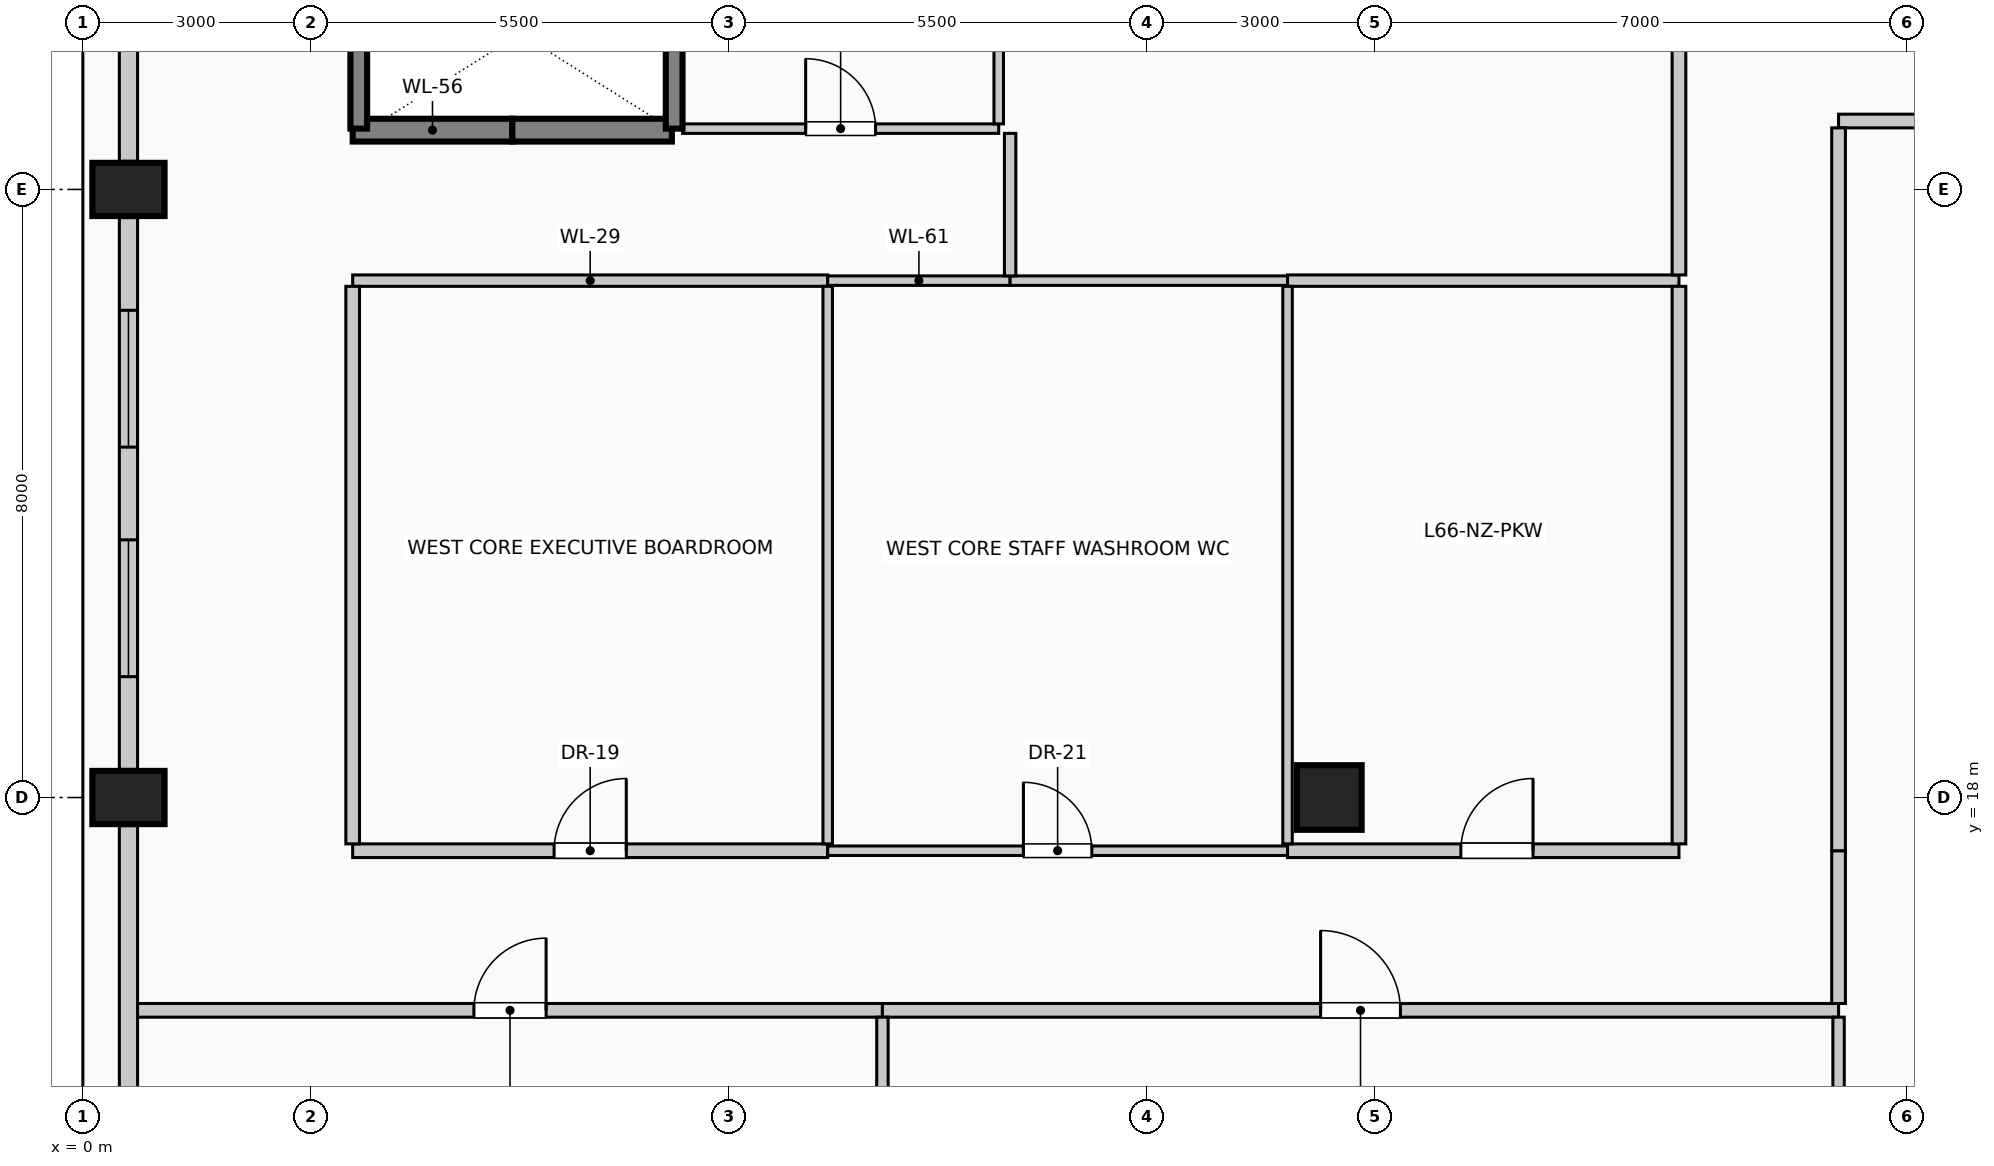
"""IFC4 building model, lengths in metres.
Left out: names, types, materials, properties, quantities, classifications, styles, units other than length and angle.
Written with IfcOpenShell. Run it as: python <this file> out.ifc"""

import sys

from ifc_helpers import new_model, si_unit, direction, frame, frame_2d, origin, origin_2d, place, context, subcontext, project, spatial, rectangle, circle, extrude, element, fill, save


model = new_model("IFC4")
c1 = context("Model", 3, precision=1e-05, world=origin(), true_north=direction((0.0, 1.0)))
c2 = subcontext(c1, "Body", "Model", "MODEL_VIEW")
j1 = project(units=[si_unit("LENGTHUNIT", "METRE"), si_unit("PLANEANGLEUNIT", "RADIAN")], contexts=[c1])
p1 = place(None, origin())
s1 = spatial("IfcSite", under=j1, at=p1, CompositionType="ELEMENT")
p2 = place(p1, origin())
s2 = spatial("IfcBuilding", under=s1, at=p2, CompositionType="ELEMENT")
p3 = place(p2, frame((0.0, 0.0, 272.6)))
s3 = spatial("IfcBuildingStorey", under=s2, at=p3, CompositionType="ELEMENT", Elevation=272.6)
for number, where, z_axis, x_axis in (
    (1, (0.6, 18.0, 0.0), (0.0, 0.0, 1.0), (0.0, 1.0, 0.0)),
    (2, (0.6, 26.0, 0.0), (0.0, 0.0, 1.0), (0.0, 1.0, 0.0)),
):
    element("IfcColumn", number, at=place(p3, frame(where, z_axis=z_axis, x_axis=x_axis)), inside=s3, PredefinedType="COLUMN", context=c2, shape_type="SweptSolid", body=[
        extrude(rectangle(XDim=0.7, YDim=0.95, at=origin_2d()), origin(), (0.0, 0.0, 1.0), 4.0),
    ])
p4 = place(p3, frame((16.4, 18.0, 0.0), z_axis=(0.0, 0.0, 1.0), x_axis=(1.0, 0.0, 0.0)))
e3 = element("IfcColumn", 3, at=p4, inside=s3, PredefinedType="COLUMN", context=c2, shape_type="SweptSolid", body=[
    extrude(circle(Radius=0.425, at=origin_2d()), origin(), (0.0, 0.0, 1.0), 4.0),
])
p5 = place(p3, frame((0.6, 10.37, 0.0), z_axis=(0.0, 0.0, 1.0), x_axis=(0.0, 1.0, 0.0)))
e4 = element("IfcWall", 4, at=p5, inside=s3, PredefinedType="SOLIDWALL", context=c2, shape_type="SweptSolid", body=[
    extrude(rectangle(XDim=7.26, YDim=0.24, at=frame_2d((3.63, 0.0))), origin(), (0.0, 0.0, 1.0), 3.0),
])
p6 = place(p5, frame((1.22, 0.0, 0.42)))
e5 = element("IfcOpeningElement", 5, at=p6, cuts=e4, PredefinedType="OPENING", context=c2, shape_type="SweptSolid", body=[
    extrude(rectangle(XDim=1.8, YDim=2.2, at=frame_2d((0.9, 1.1))), frame((0.0, 0.13, 0.0), z_axis=(0.0, -1.0, 0.0), x_axis=(1.0, 0.0, 0.0)), (0.0, 0.0, 1.0), 0.26),
])
p7 = place(p3, frame((0.6, 18.37, 0.0), z_axis=(0.0, 0.0, 1.0), x_axis=(0.0, 1.0, 0.0)))
e6 = element("IfcWall", 6, at=p7, inside=s3, PredefinedType="SOLIDWALL", context=c2, shape_type="SweptSolid", body=[
    extrude(rectangle(XDim=7.26, YDim=0.24, at=frame_2d((3.63, 0.0))), origin(), (0.0, 0.0, 1.0), 3.0),
])
p8 = place(p7, frame((1.22, 0.0, 0.42)))
e7 = element("IfcOpeningElement", 7, at=p8, cuts=e6, PredefinedType="OPENING", context=c2, shape_type="SweptSolid", body=[
    extrude(rectangle(XDim=1.8, YDim=2.2, at=frame_2d((0.9, 1.1))), frame((0.0, 0.13, 0.0), z_axis=(0.0, -1.0, 0.0), x_axis=(1.0, 0.0, 0.0)), (0.0, 0.0, 1.0), 0.26),
])
p9 = place(p7, frame((4.24, 0.0, 0.42)))
e8 = element("IfcOpeningElement", 8, at=p9, cuts=e6, PredefinedType="OPENING", context=c2, shape_type="SweptSolid", body=[
    extrude(rectangle(XDim=1.8, YDim=2.2, at=frame_2d((0.9, 1.1))), frame((0.0, 0.13, 0.0), z_axis=(0.0, -1.0, 0.0), x_axis=(1.0, 0.0, 0.0)), (0.0, 0.0, 1.0), 0.26),
])
p10 = place(p3, frame((0.6, 26.37, 0.0), z_axis=(0.0, 0.0, 1.0), x_axis=(0.0, 1.0, 0.0)))
e9 = element("IfcWall", 9, at=p10, inside=s3, PredefinedType="SOLIDWALL", context=c2, shape_type="SweptSolid", body=[
    extrude(rectangle(XDim=7.26, YDim=0.24, at=frame_2d((3.63, 0.0))), origin(), (0.0, 0.0, 1.0), 3.0),
])
p11 = place(p3, frame((5.65, 26.78, 0.0), z_axis=(0.0, 0.0, 1.0), x_axis=(-1.0, 0.0, 0.0)))
e10 = element("IfcWall", 10, at=p11, inside=s3, PredefinedType="SOLIDWALL", context=c2, shape_type="SweptSolid", body=[
    extrude(rectangle(XDim=2.1, YDim=0.3, at=frame_2d((1.05, 0.0))), origin(), (0.0, 0.0, 1.0), 4.0),
])
p12 = place(p3, frame((7.75, 26.78, 0.0), z_axis=(0.0, 0.0, 1.0), x_axis=(-1.0, 0.0, 0.0)))
e11 = element("IfcWall", 11, at=p12, inside=s3, PredefinedType="SOLIDWALL", context=c2, shape_type="SweptSolid", body=[
    extrude(rectangle(XDim=2.1, YDim=0.3, at=frame_2d((1.05, 0.0))), origin(), (0.0, 0.0, 1.0), 4.0),
])
p13 = place(p3, frame((3.63, 26.8, 0.0), z_axis=(0.0, 0.0, 1.0), x_axis=(0.0, 1.0, 0.0)))
e12 = element("IfcWall", 12, at=p13, inside=s3, PredefinedType="SOLIDWALL", context=c2, shape_type="SweptSolid", body=[
    extrude(rectangle(XDim=5.55, YDim=0.22, at=frame_2d((2.775, 0.0))), origin(), (0.0, 0.0, 1.0), 4.0),
])
p14 = place(p3, frame((7.78, 26.8, 0.0), z_axis=(0.0, 0.0, 1.0), x_axis=(0.0, 1.0, 0.0)))
e13 = element("IfcWall", 13, at=p14, inside=s3, PredefinedType="SOLIDWALL", context=c2, shape_type="SweptSolid", body=[
    extrude(rectangle(XDim=2.8, YDim=0.22, at=frame_2d((1.4, 0.0))), origin(), (0.0, 0.0, 1.0), 4.0),
])
p15 = place(p3, frame((0.72, 15.2, 0.0), z_axis=(0.0, 0.0, 1.0), x_axis=(1.0, 0.0, 0.0)))
e14 = element("IfcWall", 14, at=p15, inside=s3, PredefinedType="PARTITIONING", context=c2, shape_type="SweptSolid", body=[
    extrude(rectangle(XDim=9.8, YDim=0.18, at=frame_2d((4.9, 0.0))), origin(), (0.0, 0.0, 1.0), 3.75),
])
p16 = place(p15, frame((4.425, 0.0, 0.0)))
e15 = element("IfcOpeningElement", 15, at=p16, cuts=e14, PredefinedType="OPENING", context=c2, shape_type="SweptSolid", body=[
    extrude(rectangle(XDim=0.95, YDim=2.15, at=frame_2d((0.475, 1.075))), frame((0.0, 0.1, 0.0), z_axis=(0.0, -1.0, 0.0), x_axis=(1.0, 0.0, 0.0)), (0.0, 0.0, 1.0), 0.2),
])
p17 = place(p3, frame((10.52, 15.2, 0.0), z_axis=(0.0, 0.0, 1.0), x_axis=(1.0, 0.0, 0.0)))
e16 = element("IfcWall", 16, at=p17, inside=s3, PredefinedType="PARTITIONING", context=c2, shape_type="SweptSolid", body=[
    extrude(rectangle(XDim=12.58, YDim=0.18, at=frame_2d((6.29, 0.0))), origin(), (0.0, 0.0, 1.0), 3.75),
])
p18 = place(p17, frame((5.765, 0.0, 0.0)))
e17 = element("IfcOpeningElement", 17, at=p18, cuts=e16, PredefinedType="OPENING", context=c2, shape_type="SweptSolid", body=[
    extrude(rectangle(XDim=1.05, YDim=2.15, at=frame_2d((0.525, 1.075))), frame((0.0, 0.1, 0.0), z_axis=(0.0, -1.0, 0.0), x_axis=(1.0, 0.0, 0.0)), (0.0, 0.0, 1.0), 0.2),
])
p19 = place(p3, frame((3.55, 17.3, 0.0), z_axis=(0.0, 0.0, 1.0), x_axis=(1.0, 0.0, 0.0)))
e18 = element("IfcWall", 18, at=p19, inside=s3, PredefinedType="PARTITIONING", context=c2, shape_type="SweptSolid", body=[
    extrude(rectangle(XDim=6.25, YDim=0.18, at=frame_2d((3.125, 0.0))), origin(), (0.0, 0.0, 1.0), 3.75),
])
p20 = place(p19, frame((2.65, 0.0, 0.0)))
e19 = element("IfcOpeningElement", 19, at=p20, cuts=e18, PredefinedType="OPENING", context=c2, shape_type="SweptSolid", body=[
    extrude(rectangle(XDim=0.95, YDim=2.15, at=frame_2d((0.475, 1.075))), frame((0.0, 0.1, 0.0), z_axis=(0.0, -1.0, 0.0), x_axis=(1.0, 0.0, 0.0)), (0.0, 0.0, 1.0), 0.2),
])
p21 = place(p3, frame((9.8, 17.3, 0.0), z_axis=(0.0, 0.0, 1.0), x_axis=(1.0, 0.0, 0.0)))
e20 = element("IfcWall", 20, at=p21, inside=s3, PredefinedType="PARTITIONING", context=c2, shape_type="SweptSolid", body=[
    extrude(rectangle(XDim=6.05, YDim=0.125, at=frame_2d((3.025, 0.0))), origin(), (0.0, 0.0, 1.0), 3.75),
])
p22 = place(p21, frame((2.575, 0.0, 0.0)))
e21 = element("IfcOpeningElement", 21, at=p22, cuts=e20, PredefinedType="OPENING", context=c2, shape_type="SweptSolid", body=[
    extrude(rectangle(XDim=0.9, YDim=2.1, at=frame_2d((0.45, 1.05))), frame((0.0, 0.073, 0.0), z_axis=(0.0, -1.0, 0.0), x_axis=(1.0, 0.0, 0.0)), (0.0, 0.0, 1.0), 0.145),
])
p23 = place(p3, frame((15.85, 17.3, 0.0), z_axis=(0.0, 0.0, 1.0), x_axis=(1.0, 0.0, 0.0)))
e22 = element("IfcWall", 22, at=p23, inside=s3, PredefinedType="PARTITIONING", context=c2, shape_type="SweptSolid", body=[
    extrude(rectangle(XDim=5.15, YDim=0.18, at=frame_2d((2.575, 0.0))), origin(), (0.0, 0.0, 1.0), 3.75),
])
p24 = place(p23, frame((2.28, 0.0, 0.0)))
e23 = element("IfcOpeningElement", 23, at=p24, cuts=e22, PredefinedType="OPENING", context=c2, shape_type="SweptSolid", body=[
    extrude(rectangle(XDim=0.95, YDim=2.15, at=frame_2d((0.475, 1.075))), frame((0.0, 0.1, 0.0), z_axis=(0.0, -1.0, 0.0), x_axis=(1.0, 0.0, 0.0)), (0.0, 0.0, 1.0), 0.2),
])
p25 = place(p3, frame((3.55, 24.8, 0.0), z_axis=(0.0, 0.0, 1.0), x_axis=(1.0, 0.0, 0.0)))
e24 = element("IfcWall", 24, at=p25, inside=s3, PredefinedType="PARTITIONING", context=c2, shape_type="SweptSolid", body=[
    extrude(rectangle(XDim=6.25, YDim=0.15, at=frame_2d((3.125, 0.0))), origin(), (0.0, 0.0, 1.0), 3.75),
])
p26 = place(p3, frame((9.8, 24.8, 0.0), z_axis=(0.0, 0.0, 1.0), x_axis=(1.0, 0.0, 0.0)))
e25 = element("IfcWall", 25, at=p26, inside=s3, PredefinedType="PARTITIONING", context=c2, shape_type="SweptSolid", body=[
    extrude(rectangle(XDim=2.4, YDim=0.125, at=frame_2d((1.2, 0.0))), origin(), (0.0, 0.0, 1.0), 3.75),
])
p27 = place(p3, frame((12.2, 24.8, 0.0), z_axis=(0.0, 0.0, 1.0), x_axis=(1.0, 0.0, 0.0)))
e26 = element("IfcWall", 26, at=p27, inside=s3, PredefinedType="PARTITIONING", context=c2, shape_type="SweptSolid", body=[
    extrude(rectangle(XDim=3.65, YDim=0.125, at=frame_2d((1.825, 0.0))), origin(), (0.0, 0.0, 1.0), 3.75),
])
p28 = place(p3, frame((15.85, 24.8, 0.0), z_axis=(0.0, 0.0, 1.0), x_axis=(1.0, 0.0, 0.0)))
e27 = element("IfcWall", 27, at=p28, inside=s3, PredefinedType="PARTITIONING", context=c2, shape_type="SweptSolid", body=[
    extrude(rectangle(XDim=5.15, YDim=0.15, at=frame_2d((2.575, 0.0))), origin(), (0.0, 0.0, 1.0), 3.75),
])
p29 = place(p3, frame((7.89, 26.8, 0.0), z_axis=(0.0, 0.0, 1.0), x_axis=(1.0, 0.0, 0.0)))
e28 = element("IfcWall", 28, at=p29, inside=s3, PredefinedType="PARTITIONING", context=c2, shape_type="SweptSolid", body=[
    extrude(rectangle(XDim=4.16, YDim=0.125, at=frame_2d((2.08, 0.0))), origin(), (0.0, 0.0, 1.0), 3.75),
])
p30 = place(p29, frame((1.62, 0.0, 0.0)))
e29 = element("IfcOpeningElement", 29, at=p30, cuts=e28, PredefinedType="OPENING", context=c2, shape_type="SweptSolid", body=[
    extrude(rectangle(XDim=0.92, YDim=2.1, at=frame_2d((0.46, 1.05))), frame((0.0, 0.073, 0.0), z_axis=(0.0, -1.0, 0.0), x_axis=(1.0, 0.0, 0.0)), (0.0, 0.0, 1.0), 0.145),
])
p31 = place(p3, frame((23.1, 26.9, 0.0), z_axis=(0.0, 0.0, 1.0), x_axis=(1.0, 0.0, 0.0)))
e30 = element("IfcWall", 30, at=p31, inside=s3, PredefinedType="PARTITIONING", context=c2, shape_type="SweptSolid", body=[
    extrude(rectangle(XDim=14.02, YDim=0.18, at=frame_2d((7.01, 0.0))), origin(), (0.0, 0.0, 1.0), 3.75),
])
p32 = place(p31, frame((6.535, 0.0, 0.0)))
e31 = element("IfcOpeningElement", 31, at=p32, cuts=e30, PredefinedType="OPENING", context=c2, shape_type="SweptSolid", body=[
    extrude(rectangle(XDim=0.95, YDim=2.15, at=frame_2d((0.475, 1.075))), frame((0.0, 0.1, 0.0), z_axis=(0.0, -1.0, 0.0), x_axis=(1.0, 0.0, 0.0)), (0.0, 0.0, 1.0), 0.2),
])
p33 = place(p3, frame((3.55, 17.39, 0.0), z_axis=(0.0, 0.0, 1.0), x_axis=(0.0, 1.0, 0.0)))
e32 = element("IfcWall", 32, at=p33, inside=s3, PredefinedType="PARTITIONING", context=c2, shape_type="SweptSolid", body=[
    extrude(rectangle(XDim=7.335, YDim=0.18, at=frame_2d((3.667, 0.0))), origin(), (0.0, 0.0, 1.0), 3.75),
])
p34 = place(p3, frame((9.8, 17.39, 0.0), z_axis=(0.0, 0.0, 1.0), x_axis=(0.0, 1.0, 0.0)))
e33 = element("IfcWall", 33, at=p34, inside=s3, PredefinedType="PARTITIONING", context=c2, shape_type="SweptSolid", body=[
    extrude(rectangle(XDim=7.335, YDim=0.125, at=frame_2d((3.667, 0.0))), origin(), (0.0, 0.0, 1.0), 3.75),
])
p35 = place(p3, frame((10.52, 0.72, 0.0), z_axis=(0.0, 0.0, 1.0), x_axis=(0.0, 1.0, 0.0)))
e34 = element("IfcWall", 34, at=p35, inside=s3, PredefinedType="PARTITIONING", context=c2, shape_type="SweptSolid", body=[
    extrude(rectangle(XDim=14.39, YDim=0.15, at=frame_2d((7.195, 0.0))), origin(), (0.0, 0.0, 1.0), 3.75),
])
p36 = place(p3, frame((12.05, 26.863, 0.0), z_axis=(0.0, 0.0, 1.0), x_axis=(0.0, 1.0, 0.0)))
e35 = element("IfcWall", 35, at=p36, inside=s3, PredefinedType="PARTITIONING", context=c2, shape_type="SweptSolid", body=[
    extrude(rectangle(XDim=2.777, YDim=0.125, at=frame_2d((1.389, 0.0))), origin(), (0.0, 0.0, 1.0), 3.75),
])
p37 = place(p3, frame((12.2, 24.863, 0.0), z_axis=(0.0, 0.0, 1.0), x_axis=(0.0, 1.0, 0.0)))
e36 = element("IfcWall", 36, at=p37, inside=s3, PredefinedType="PARTITIONING", context=c2, shape_type="SweptSolid", body=[
    extrude(rectangle(XDim=1.875, YDim=0.15, at=frame_2d((0.938, 0.0))), origin(), (0.0, 0.0, 1.0), 3.75),
])
p38 = place(p3, frame((15.85, 17.39, 0.0), z_axis=(0.0, 0.0, 1.0), x_axis=(0.0, 1.0, 0.0)))
e37 = element("IfcWall", 37, at=p38, inside=s3, PredefinedType="PARTITIONING", context=c2, shape_type="SweptSolid", body=[
    extrude(rectangle(XDim=7.335, YDim=0.125, at=frame_2d((3.667, 0.0))), origin(), (0.0, 0.0, 1.0), 3.75),
])
p39 = place(p3, frame((21.0, 17.39, 0.0), z_axis=(0.0, 0.0, 1.0), x_axis=(0.0, 1.0, 0.0)))
e38 = element("IfcWall", 38, at=p39, inside=s3, PredefinedType="PARTITIONING", context=c2, shape_type="SweptSolid", body=[
    extrude(rectangle(XDim=7.335, YDim=0.18, at=frame_2d((3.667, 0.0))), origin(), (0.0, 0.0, 1.0), 3.75),
])
p40 = place(p3, frame((21.0, 24.875, 0.0), z_axis=(0.0, 0.0, 1.0), x_axis=(0.0, 1.0, 0.0)))
e39 = element("IfcWall", 39, at=p40, inside=s3, PredefinedType="PARTITIONING", context=c2, shape_type="SweptSolid", body=[
    extrude(rectangle(XDim=7.385, YDim=0.18, at=frame_2d((3.692, 0.0))), origin(), (0.0, 0.0, 1.0), 3.75),
])
p41 = place(p3, frame((23.1, 0.72, 0.0), z_axis=(0.0, 0.0, 1.0), x_axis=(0.0, 1.0, 0.0)))
e40 = element("IfcWall", 40, at=p41, inside=s3, PredefinedType="PARTITIONING", context=c2, shape_type="SweptSolid", body=[
    extrude(rectangle(XDim=14.39, YDim=0.15, at=frame_2d((7.195, 0.0))), origin(), (0.0, 0.0, 1.0), 3.75),
])
p42 = place(p3, frame((23.1, 15.29, 0.0), z_axis=(0.0, 0.0, 1.0), x_axis=(0.0, 1.0, 0.0)))
e41 = element("IfcWall", 41, at=p42, inside=s3, PredefinedType="PARTITIONING", context=c2, shape_type="SweptSolid", body=[
    extrude(rectangle(XDim=2.01, YDim=0.18, at=frame_2d((1.005, 0.0))), origin(), (0.0, 0.0, 1.0), 3.75),
])
p43 = place(p3, frame((23.1, 17.3, 0.0), z_axis=(0.0, 0.0, 1.0), x_axis=(0.0, 1.0, 0.0)))
e42 = element("IfcWall", 42, at=p43, inside=s3, PredefinedType="PARTITIONING", context=c2, shape_type="SweptSolid", body=[
    extrude(rectangle(XDim=9.51, YDim=0.18, at=frame_2d((4.755, 0.0))), origin(), (0.0, 0.0, 1.0), 3.75),
])
p44 = place(p8, origin())
e43 = element("IfcWindow", 43, at=p44, inside=s3, PartitioningType="SINGLE_PANEL", PredefinedType="WINDOW", context=c2, shape_type="SweptSolid", body=[
    extrude(rectangle(XDim=1.8, YDim=2.2, at=frame_2d((0.9, 1.1))), frame((0.0, 0.03, 0.0), z_axis=(0.0, -1.0, 0.0), x_axis=(1.0, 0.0, 0.0)), (0.0, 0.0, 1.0), 0.06),
])
fill(e7, e43)
p45 = place(p9, origin())
e44 = element("IfcWindow", 44, at=p45, inside=s3, PartitioningType="SINGLE_PANEL", PredefinedType="WINDOW", context=c2, shape_type="SweptSolid", body=[
    extrude(rectangle(XDim=1.8, YDim=2.2, at=frame_2d((0.9, 1.1))), frame((0.0, 0.03, 0.0), z_axis=(0.0, -1.0, 0.0), x_axis=(1.0, 0.0, 0.0)), (0.0, 0.0, 1.0), 0.06),
])
fill(e8, e44)
p46 = place(p16, origin())
e45 = element("IfcDoor", 45, at=p46, inside=s3, OperationType="SINGLE_SWING_RIGHT", PredefinedType="DOOR", context=c2, shape_type="SweptSolid", body=[
    extrude(rectangle(XDim=0.95, YDim=2.15, at=frame_2d((0.475, 1.075))), frame((0.0, 0.025, 0.0), z_axis=(0.0, -1.0, 0.0), x_axis=(1.0, 0.0, 0.0)), (0.0, 0.0, 1.0), 0.05),
])
fill(e15, e45)
p47 = place(p18, origin())
e46 = element("IfcDoor", 46, at=p47, inside=s3, OperationType="SINGLE_SWING_LEFT", PredefinedType="DOOR", context=c2, shape_type="SweptSolid", body=[
    extrude(rectangle(XDim=1.05, YDim=2.15, at=frame_2d((0.525, 1.075))), frame((0.0, 0.025, 0.0), z_axis=(0.0, -1.0, 0.0), x_axis=(1.0, 0.0, 0.0)), (0.0, 0.0, 1.0), 0.05),
])
fill(e17, e46)
p48 = place(p20, origin())
e47 = element("IfcDoor", 47, at=p48, inside=s3, OperationType="SINGLE_SWING_RIGHT", PredefinedType="DOOR", context=c2, shape_type="SweptSolid", body=[
    extrude(rectangle(XDim=0.95, YDim=2.15, at=frame_2d((0.475, 1.075))), frame((0.0, 0.025, 0.0), z_axis=(0.0, -1.0, 0.0), x_axis=(1.0, 0.0, 0.0)), (0.0, 0.0, 1.0), 0.05),
])
fill(e19, e47)
p49 = place(p22, origin())
e48 = element("IfcDoor", 48, at=p49, inside=s3, OperationType="SINGLE_SWING_LEFT", PredefinedType="DOOR", context=c2, shape_type="SweptSolid", body=[
    extrude(rectangle(XDim=0.9, YDim=2.1, at=frame_2d((0.45, 1.05))), frame((0.0, 0.025, 0.0), z_axis=(0.0, -1.0, 0.0), x_axis=(1.0, 0.0, 0.0)), (0.0, 0.0, 1.0), 0.05),
])
fill(e21, e48)
p50 = place(p24, origin())
e49 = element("IfcDoor", 49, at=p50, inside=s3, OperationType="SINGLE_SWING_RIGHT", PredefinedType="DOOR", context=c2, shape_type="SweptSolid", body=[
    extrude(rectangle(XDim=0.95, YDim=2.15, at=frame_2d((0.475, 1.075))), frame((0.0, 0.025, 0.0), z_axis=(0.0, -1.0, 0.0), x_axis=(1.0, 0.0, 0.0)), (0.0, 0.0, 1.0), 0.05),
])
fill(e23, e49)
p51 = place(p30, origin())
e50 = element("IfcDoor", 50, at=p51, inside=s3, OperationType="SINGLE_SWING_LEFT", PredefinedType="DOOR", context=c2, shape_type="SweptSolid", body=[
    extrude(rectangle(XDim=0.92, YDim=2.1, at=frame_2d((0.46, 1.05))), frame((0.0, 0.025, 0.0), z_axis=(0.0, -1.0, 0.0), x_axis=(1.0, 0.0, 0.0)), (0.0, 0.0, 1.0), 0.05),
])
fill(e29, e50)
save(model, sys.argv[1])
